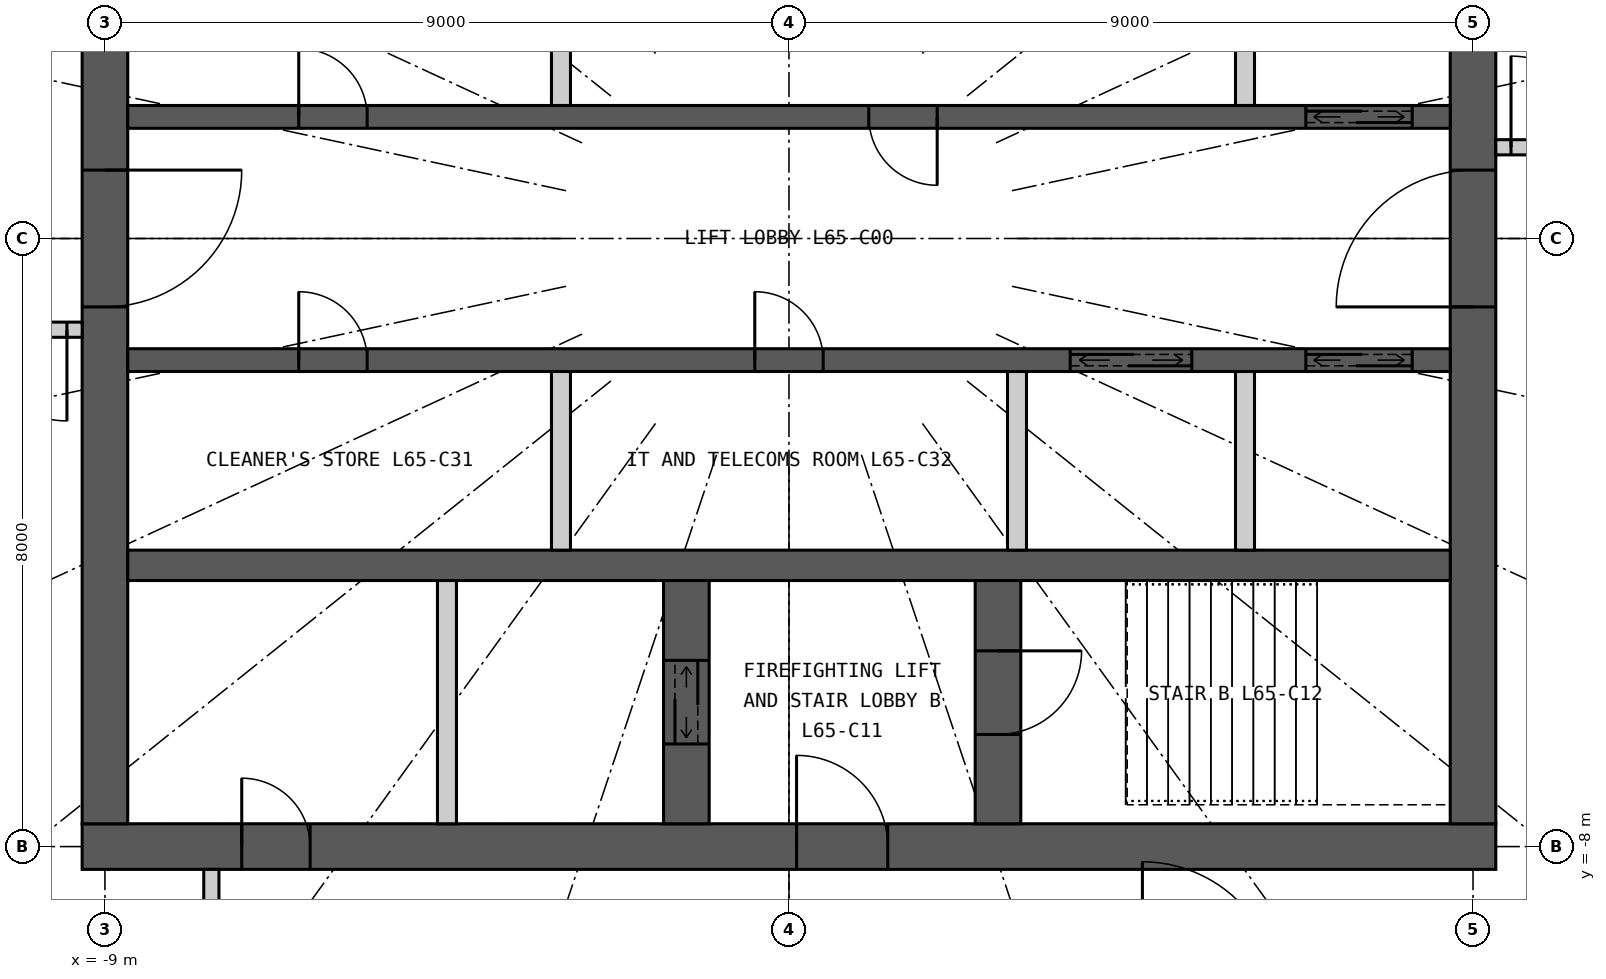
"""IFC4 building model, lengths in metres.
Left out: names, types, materials, properties, quantities, classifications, styles, units other than length and angle.
Written with IfcOpenShell. Run it as: python <this file> out.ifc"""

import sys

from ifc_helpers import new_model, si_unit, direction, frame, frame_2d, origin, place, context, subcontext, project, spatial, rectangle, extrude, element, fill, save


model = new_model("IFC4")
c1 = context("Model", 3, precision=1e-05, world=origin(), true_north=direction((0.0, 1.0)))
c2 = subcontext(c1, "Body", "Model", "MODEL_VIEW")
j1 = project(units=[si_unit("LENGTHUNIT", "METRE"), si_unit("PLANEANGLEUNIT", "RADIAN")], contexts=[c1])
p1 = place(None, origin())
s1 = spatial("IfcSite", under=j1, at=p1, CompositionType="ELEMENT")
p2 = place(p1, origin())
s2 = spatial("IfcBuilding", under=s1, at=p2, CompositionType="ELEMENT")
p3 = place(p2, frame((0.0, 0.0, 242.7)))
s3 = spatial("IfcBuildingStorey", under=s2, at=p3, CompositionType="ELEMENT", Elevation=242.7)
p4 = place(p3, frame((9.3, -8.0, 0.0), z_axis=(0.0, 0.0, 1.0), x_axis=(-1.0, 0.0, 0.0)))
e1 = element("IfcWall", 1, at=p4, inside=s3, PredefinedType="SHEAR", context=c2, shape_type="SweptSolid", body=[
    extrude(rectangle(XDim=18.6, YDim=0.6, at=frame_2d((9.3, 0.0))), origin(), (0.0, 0.0, 1.0), 6.0),
])
p5 = place(p4, frame((8.0, 0.0, 0.0)))
e2 = element("IfcOpeningElement", 2, at=p5, cuts=e1, PredefinedType="OPENING", context=c2, shape_type="SweptSolid", body=[
    extrude(rectangle(XDim=1.2, YDim=2.2, at=frame_2d((0.6, 1.1))), frame((0.0, 0.31, 0.0), z_axis=(0.0, -1.0, 0.0), x_axis=(1.0, 0.0, 0.0)), (0.0, 0.0, 1.0), 0.62),
])
p6 = place(p4, frame((15.6, 0.0, 0.0)))
e3 = element("IfcOpeningElement", 3, at=p6, cuts=e1, PredefinedType="OPENING", context=c2, shape_type="SweptSolid", body=[
    extrude(rectangle(XDim=0.9, YDim=2.2, at=frame_2d((0.45, 1.1))), frame((0.0, 0.31, 0.0), z_axis=(0.0, -1.0, 0.0), x_axis=(1.0, 0.0, 0.0)), (0.0, 0.0, 1.0), 0.62),
])
p7 = place(p3, frame((9.0, -7.7, 0.0), z_axis=(0.0, 0.0, 1.0), x_axis=(0.0, 1.0, 0.0)))
e4 = element("IfcWall", 4, at=p7, inside=s3, PredefinedType="SHEAR", context=c2, shape_type="SweptSolid", body=[
    extrude(rectangle(XDim=15.4, YDim=0.6, at=frame_2d((7.7, 0.0))), origin(), (0.0, 0.0, 1.0), 6.0),
])
p8 = place(p7, frame((6.8, 0.0, 0.0)))
e5 = element("IfcOpeningElement", 5, at=p8, cuts=e4, PredefinedType="OPENING", context=c2, shape_type="SweptSolid", body=[
    extrude(rectangle(XDim=1.8, YDim=2.2, at=frame_2d((0.9, 1.1))), frame((0.0, 0.31, 0.0), z_axis=(0.0, -1.0, 0.0), x_axis=(1.0, 0.0, 0.0)), (0.0, 0.0, 1.0), 0.62),
])
p9 = place(p3, frame((-9.0, 7.7, 0.0), z_axis=(0.0, 0.0, 1.0), x_axis=(0.0, -1.0, 0.0)))
e6 = element("IfcWall", 6, at=p9, inside=s3, PredefinedType="SHEAR", context=c2, shape_type="SweptSolid", body=[
    extrude(rectangle(XDim=15.4, YDim=0.6, at=frame_2d((7.7, 0.0))), origin(), (0.0, 0.0, 1.0), 6.0),
])
p10 = place(p9, frame((6.8, 0.0, 0.0)))
e7 = element("IfcOpeningElement", 7, at=p10, cuts=e6, PredefinedType="OPENING", context=c2, shape_type="SweptSolid", body=[
    extrude(rectangle(XDim=1.8, YDim=2.2, at=frame_2d((0.9, 1.1))), frame((0.0, 0.31, 0.0), z_axis=(0.0, -1.0, 0.0), x_axis=(1.0, 0.0, 0.0)), (0.0, 0.0, 1.0), 0.62),
])
p11 = place(p3, frame((-8.7, 1.6, 0.0), z_axis=(0.0, 0.0, 1.0), x_axis=(1.0, 0.0, 0.0)))
e8 = element("IfcWall", 8, at=p11, inside=s3, PredefinedType="SHEAR", context=c2, shape_type="SweptSolid", body=[
    extrude(rectangle(XDim=17.4, YDim=0.3, at=frame_2d((8.7, 0.0))), origin(), (0.0, 0.0, 1.0), 6.0),
])
p12 = place(p11, frame((15.5, 0.0, 0.0)))
e9 = element("IfcOpeningElement", 9, at=p12, cuts=e8, PredefinedType="OPENING", context=c2, shape_type="SweptSolid", body=[
    extrude(rectangle(XDim=1.4, YDim=2.4, at=frame_2d((0.7, 1.2))), frame((0.0, 0.16, 0.0), z_axis=(0.0, -1.0, 0.0), x_axis=(1.0, 0.0, 0.0)), (0.0, 0.0, 1.0), 0.32),
])
p13 = place(p11, frame((2.25, 0.0, 0.0)))
e10 = element("IfcOpeningElement", 10, at=p13, cuts=e8, PredefinedType="OPENING", context=c2, shape_type="SweptSolid", body=[
    extrude(rectangle(XDim=0.9, YDim=2.2, at=frame_2d((0.45, 1.1))), frame((0.0, 0.16, 0.0), z_axis=(0.0, -1.0, 0.0), x_axis=(1.0, 0.0, 0.0)), (0.0, 0.0, 1.0), 0.32),
])
p14 = place(p11, frame((9.75, 0.0, 0.0)))
e11 = element("IfcOpeningElement", 11, at=p14, cuts=e8, PredefinedType="OPENING", context=c2, shape_type="SweptSolid", body=[
    extrude(rectangle(XDim=0.9, YDim=2.2, at=frame_2d((0.45, 1.1))), frame((0.0, 0.16, 0.0), z_axis=(0.0, -1.0, 0.0), x_axis=(1.0, 0.0, 0.0)), (0.0, 0.0, 1.0), 0.32),
])
p15 = place(p3, frame((-8.7, -4.3, 0.0), z_axis=(0.0, 0.0, 1.0), x_axis=(1.0, 0.0, 0.0)))
e12 = element("IfcWall", 12, at=p15, inside=s3, PredefinedType="SHEAR", context=c2, shape_type="SweptSolid", body=[
    extrude(rectangle(XDim=17.4, YDim=0.4, at=frame_2d((8.7, 0.0))), origin(), (0.0, 0.0, 1.0), 6.0),
])
p16 = place(p3, frame((-8.7, -1.6, 0.0), z_axis=(0.0, 0.0, 1.0), x_axis=(1.0, 0.0, 0.0)))
e13 = element("IfcWall", 13, at=p16, inside=s3, PredefinedType="SHEAR", context=c2, shape_type="SweptSolid", body=[
    extrude(rectangle(XDim=17.4, YDim=0.3, at=frame_2d((8.7, 0.0))), origin(), (0.0, 0.0, 1.0), 6.0),
])
p17 = place(p16, frame((12.4, 0.0, 0.0)))
e14 = element("IfcOpeningElement", 14, at=p17, cuts=e13, PredefinedType="OPENING", context=c2, shape_type="SweptSolid", body=[
    extrude(rectangle(XDim=1.6, YDim=2.4, at=frame_2d((0.8, 1.2))), frame((0.0, 0.16, 0.0), z_axis=(0.0, -1.0, 0.0), x_axis=(1.0, 0.0, 0.0)), (0.0, 0.0, 1.0), 0.32),
])
p18 = place(p16, frame((15.5, 0.0, 0.0)))
e15 = element("IfcOpeningElement", 15, at=p18, cuts=e13, PredefinedType="OPENING", context=c2, shape_type="SweptSolid", body=[
    extrude(rectangle(XDim=1.4, YDim=2.4, at=frame_2d((0.7, 1.2))), frame((0.0, 0.16, 0.0), z_axis=(0.0, -1.0, 0.0), x_axis=(1.0, 0.0, 0.0)), (0.0, 0.0, 1.0), 0.32),
])
p19 = place(p16, frame((2.25, 0.0, 0.0)))
e16 = element("IfcOpeningElement", 16, at=p19, cuts=e13, PredefinedType="OPENING", context=c2, shape_type="SweptSolid", body=[
    extrude(rectangle(XDim=0.9, YDim=2.2, at=frame_2d((0.45, 1.1))), frame((0.0, 0.16, 0.0), z_axis=(0.0, -1.0, 0.0), x_axis=(1.0, 0.0, 0.0)), (0.0, 0.0, 1.0), 0.32),
])
p20 = place(p16, frame((8.25, 0.0, 0.0)))
e17 = element("IfcOpeningElement", 17, at=p20, cuts=e13, PredefinedType="OPENING", context=c2, shape_type="SweptSolid", body=[
    extrude(rectangle(XDim=0.9, YDim=2.2, at=frame_2d((0.45, 1.1))), frame((0.0, 0.16, 0.0), z_axis=(0.0, -1.0, 0.0), x_axis=(1.0, 0.0, 0.0)), (0.0, 0.0, 1.0), 0.32),
])
p21 = place(p3, frame((2.75, -7.7, 0.0), z_axis=(0.0, 0.0, 1.0), x_axis=(0.0, 1.0, 0.0)))
e18 = element("IfcWall", 18, at=p21, inside=s3, PredefinedType="SHEAR", context=c2, shape_type="SweptSolid", body=[
    extrude(rectangle(XDim=3.2, YDim=0.6, at=frame_2d((1.6, 0.0))), origin(), (0.0, 0.0, 1.0), 6.0),
])
p22 = place(p21, frame((1.175, 0.0, 0.0)))
e19 = element("IfcOpeningElement", 19, at=p22, cuts=e18, PredefinedType="OPENING", context=c2, shape_type="SweptSolid", body=[
    extrude(rectangle(XDim=1.1, YDim=2.2, at=frame_2d((0.55, 1.1))), frame((0.0, 0.31, 0.0), z_axis=(0.0, -1.0, 0.0), x_axis=(1.0, 0.0, 0.0)), (0.0, 0.0, 1.0), 0.62),
])
p23 = place(p3, frame((-1.35, -7.7, 0.0), z_axis=(0.0, 0.0, 1.0), x_axis=(0.0, 1.0, 0.0)))
e20 = element("IfcWall", 20, at=p23, inside=s3, PredefinedType="SHEAR", context=c2, shape_type="SweptSolid", body=[
    extrude(rectangle(XDim=3.2, YDim=0.6, at=frame_2d((1.6, 0.0))), origin(), (0.0, 0.0, 1.0), 6.0),
])
p24 = place(p23, frame((1.05, 0.0, 0.0)))
e21 = element("IfcOpeningElement", 21, at=p24, cuts=e20, PredefinedType="OPENING", context=c2, shape_type="SweptSolid", body=[
    extrude(rectangle(XDim=1.1, YDim=2.2, at=frame_2d((0.55, 1.1))), frame((0.0, 0.31, 0.0), z_axis=(0.0, -1.0, 0.0), x_axis=(1.0, 0.0, 0.0)), (0.0, 0.0, 1.0), 0.62),
])
p25 = place(p3, frame((-4.5, -7.7, 0.0), z_axis=(0.0, 0.0, 1.0), x_axis=(0.0, 1.0, 0.0)))
e22 = element("IfcWall", 22, at=p25, inside=s3, PredefinedType="PARTITIONING", context=c2, shape_type="SweptSolid", body=[
    extrude(rectangle(XDim=3.2, YDim=0.25, at=frame_2d((1.6, 0.0))), origin(), (0.0, 0.0, 1.0), 6.0),
])
for number, where, z_axis, x_axis in (
    (23, (-3.0, 1.75, 0.0), (0.0, 0.0, 1.0), (0.0, 1.0, 0.0)),
    (24, (6.0, 1.75, 0.0), (0.0, 0.0, 1.0), (0.0, 1.0, 0.0)),
    (25, (-3.0, -4.1, 0.0), (0.0, 0.0, 1.0), (0.0, 1.0, 0.0)),
    (26, (3.0, -4.1, 0.0), (0.0, 0.0, 1.0), (0.0, 1.0, 0.0)),
    (27, (6.0, -4.1, 0.0), (0.0, 0.0, 1.0), (0.0, 1.0, 0.0)),
):
    element("IfcWall", number, at=place(p3, frame(where, z_axis=z_axis, x_axis=x_axis)), inside=s3, PredefinedType="PARTITIONING", context=c2, shape_type="SweptSolid", body=[
        extrude(rectangle(XDim=2.35, YDim=0.25, at=frame_2d((1.175, 0.0))), origin(), (0.0, 0.0, 1.0), 6.0),
    ])
p26 = place(p3, frame((-9.3, -1.2, 0.0), z_axis=(0.0, 0.0, 1.0), x_axis=(-1.0, 0.0, 0.0)))
e28 = element("IfcWall", 28, at=p26, inside=s3, PredefinedType="PARTITIONING", context=c2, shape_type="SweptSolid", body=[
    extrude(rectangle(XDim=1.7, YDim=0.2, at=frame_2d((0.85, 0.0))), origin(), (0.0, 0.0, 1.0), 5.7),
])
p27 = place(p26, frame((0.2, 0.0, 0.0)))
e29 = element("IfcOpeningElement", 29, at=p27, cuts=e28, PredefinedType="OPENING", context=c2, shape_type="SweptSolid", body=[
    extrude(rectangle(XDim=1.2, YDim=2.2, at=frame_2d((0.6, 1.1))), frame((0.0, 0.11, 0.0), z_axis=(0.0, -1.0, 0.0), x_axis=(1.0, 0.0, 0.0)), (0.0, 0.0, 1.0), 0.22),
])
p28 = place(p3, frame((-7.6, -8.3, 0.0), z_axis=(0.0, 0.0, 1.0), x_axis=(0.0, -1.0, 0.0)))
e30 = element("IfcWall", 30, at=p28, inside=s3, PredefinedType="PARTITIONING", context=c2, shape_type="SweptSolid", body=[
    extrude(rectangle(XDim=1.7, YDim=0.2, at=frame_2d((0.85, 0.0))), origin(), (0.0, 0.0, 1.0), 5.7),
])
p29 = place(p3, frame((9.3, 1.2, 0.0), z_axis=(0.0, 0.0, 1.0), x_axis=(1.0, 0.0, 0.0)))
e31 = element("IfcWall", 31, at=p29, inside=s3, PredefinedType="PARTITIONING", context=c2, shape_type="SweptSolid", body=[
    extrude(rectangle(XDim=1.7, YDim=0.2, at=frame_2d((0.85, 0.0))), origin(), (0.0, 0.0, 1.0), 5.7),
])
p30 = place(p29, frame((0.2, 0.0, 0.0)))
e32 = element("IfcOpeningElement", 32, at=p30, cuts=e31, PredefinedType="OPENING", context=c2, shape_type="SweptSolid", body=[
    extrude(rectangle(XDim=1.2, YDim=2.2, at=frame_2d((0.6, 1.1))), frame((0.0, 0.11, 0.0), z_axis=(0.0, -1.0, 0.0), x_axis=(1.0, 0.0, 0.0)), (0.0, 0.0, 1.0), 0.22),
])
p31 = place(p30, origin())
e33 = element("IfcDoor", 33, at=p31, inside=s3, OperationType="SINGLE_SWING_LEFT", PredefinedType="DOOR", context=c2, shape_type="SweptSolid", body=[
    extrude(rectangle(XDim=1.2, YDim=2.2, at=frame_2d((0.6, 1.1))), frame((0.0, 0.025, 0.0), z_axis=(0.0, -1.0, 0.0), x_axis=(1.0, 0.0, 0.0)), (0.0, 0.0, 1.0), 0.05),
])
fill(e32, e33)
p32 = place(p27, origin())
e34 = element("IfcDoor", 34, at=p32, inside=s3, OperationType="SINGLE_SWING_LEFT", PredefinedType="DOOR", context=c2, shape_type="SweptSolid", body=[
    extrude(rectangle(XDim=1.2, YDim=2.2, at=frame_2d((0.6, 1.1))), frame((0.0, 0.025, 0.0), z_axis=(0.0, -1.0, 0.0), x_axis=(1.0, 0.0, 0.0)), (0.0, 0.0, 1.0), 0.05),
])
fill(e29, e34)
p33 = place(p5, origin())
e35 = element("IfcDoor", 35, at=p33, inside=s3, OperationType="SINGLE_SWING_RIGHT", PredefinedType="DOOR", context=c2, shape_type="SweptSolid", body=[
    extrude(rectangle(XDim=1.2, YDim=2.2, at=frame_2d((0.6, 1.1))), frame((0.0, 0.025, 0.0), z_axis=(0.0, -1.0, 0.0), x_axis=(1.0, 0.0, 0.0)), (0.0, 0.0, 1.0), 0.05),
])
fill(e2, e35)
p34 = place(p22, origin())
e36 = element("IfcDoor", 36, at=p34, inside=s3, OperationType="SINGLE_SWING_RIGHT", PredefinedType="DOOR", context=c2, shape_type="SweptSolid", body=[
    extrude(rectangle(XDim=1.1, YDim=2.2, at=frame_2d((0.55, 1.1))), frame((0.0, 0.025, 0.0), z_axis=(0.0, -1.0, 0.0), x_axis=(1.0, 0.0, 0.0)), (0.0, 0.0, 1.0), 0.05),
])
fill(e19, e36)
p35 = place(p24, origin())
e37 = element("IfcDoor", 37, at=p35, inside=s3, OperationType="DOUBLE_DOOR_SLIDING", PredefinedType="DOOR", context=c2, shape_type="SweptSolid", body=[
    extrude(rectangle(XDim=1.1, YDim=2.2, at=frame_2d((0.55, 1.1))), frame((0.0, 0.025, 0.0), z_axis=(0.0, -1.0, 0.0), x_axis=(1.0, 0.0, 0.0)), (0.0, 0.0, 1.0), 0.05),
])
fill(e21, e37)
p36 = place(p6, origin())
e38 = element("IfcDoor", 38, at=p36, inside=s3, OperationType="SINGLE_SWING_RIGHT", PredefinedType="DOOR", context=c2, shape_type="SweptSolid", body=[
    extrude(rectangle(XDim=0.9, YDim=2.2, at=frame_2d((0.45, 1.1))), frame((0.0, 0.025, 0.0), z_axis=(0.0, -1.0, 0.0), x_axis=(1.0, 0.0, 0.0)), (0.0, 0.0, 1.0), 0.05),
])
fill(e3, e38)
p37 = place(p12, origin())
e39 = element("IfcDoor", 39, at=p37, inside=s3, OperationType="DOUBLE_DOOR_SLIDING", PredefinedType="DOOR", context=c2, shape_type="SweptSolid", body=[
    extrude(rectangle(XDim=1.4, YDim=2.4, at=frame_2d((0.7, 1.2))), frame((0.0, 0.025, 0.0), z_axis=(0.0, -1.0, 0.0), x_axis=(1.0, 0.0, 0.0)), (0.0, 0.0, 1.0), 0.05),
])
fill(e9, e39)
p38 = place(p17, origin())
e40 = element("IfcDoor", 40, at=p38, inside=s3, OperationType="DOUBLE_DOOR_SLIDING", PredefinedType="DOOR", context=c2, shape_type="SweptSolid", body=[
    extrude(rectangle(XDim=1.6, YDim=2.4, at=frame_2d((0.8, 1.2))), frame((0.0, 0.025, 0.0), z_axis=(0.0, -1.0, 0.0), x_axis=(1.0, 0.0, 0.0)), (0.0, 0.0, 1.0), 0.05),
])
fill(e14, e40)
p39 = place(p18, origin())
e41 = element("IfcDoor", 41, at=p39, inside=s3, OperationType="DOUBLE_DOOR_SLIDING", PredefinedType="DOOR", context=c2, shape_type="SweptSolid", body=[
    extrude(rectangle(XDim=1.4, YDim=2.4, at=frame_2d((0.7, 1.2))), frame((0.0, 0.025, 0.0), z_axis=(0.0, -1.0, 0.0), x_axis=(1.0, 0.0, 0.0)), (0.0, 0.0, 1.0), 0.05),
])
fill(e15, e41)
p40 = place(p13, origin())
e42 = element("IfcDoor", 42, at=p40, inside=s3, OperationType="SINGLE_SWING_LEFT", PredefinedType="DOOR", context=c2, shape_type="SweptSolid", body=[
    extrude(rectangle(XDim=0.9, YDim=2.2, at=frame_2d((0.45, 1.1))), frame((0.0, 0.025, 0.0), z_axis=(0.0, -1.0, 0.0), x_axis=(1.0, 0.0, 0.0)), (0.0, 0.0, 1.0), 0.05),
])
fill(e10, e42)
p41 = place(p14, origin())
e43 = element("IfcDoor", 43, at=p41, inside=s3, OperationType="SINGLE_SWING_RIGHT", PredefinedType="DOOR", context=c2, shape_type="SweptSolid", body=[
    extrude(rectangle(XDim=0.9, YDim=2.2, at=frame_2d((0.45, 1.1))), frame((0.0, 0.025, 0.0), z_axis=(0.0, -1.0, 0.0), x_axis=(1.0, 0.0, 0.0)), (0.0, 0.0, 1.0), 0.05),
])
fill(e11, e43)
p42 = place(p19, origin())
e44 = element("IfcDoor", 44, at=p42, inside=s3, OperationType="SINGLE_SWING_LEFT", PredefinedType="DOOR", context=c2, shape_type="SweptSolid", body=[
    extrude(rectangle(XDim=0.9, YDim=2.2, at=frame_2d((0.45, 1.1))), frame((0.0, 0.025, 0.0), z_axis=(0.0, -1.0, 0.0), x_axis=(1.0, 0.0, 0.0)), (0.0, 0.0, 1.0), 0.05),
])
fill(e16, e44)
p43 = place(p20, origin())
e45 = element("IfcDoor", 45, at=p43, inside=s3, OperationType="SINGLE_SWING_LEFT", PredefinedType="DOOR", context=c2, shape_type="SweptSolid", body=[
    extrude(rectangle(XDim=0.9, YDim=2.2, at=frame_2d((0.45, 1.1))), frame((0.0, 0.025, 0.0), z_axis=(0.0, -1.0, 0.0), x_axis=(1.0, 0.0, 0.0)), (0.0, 0.0, 1.0), 0.05),
])
fill(e17, e45)
p44 = place(p8, origin())
e46 = element("IfcDoor", 46, at=p44, inside=s3, OperationType="DOUBLE_DOOR_DOUBLE_SWING", PredefinedType="DOOR", context=c2, shape_type="SweptSolid", body=[
    extrude(rectangle(XDim=1.8, YDim=2.2, at=frame_2d((0.9, 1.1))), frame((0.0, 0.025, 0.0), z_axis=(0.0, -1.0, 0.0), x_axis=(1.0, 0.0, 0.0)), (0.0, 0.0, 1.0), 0.05),
])
fill(e5, e46)
p45 = place(p10, origin())
e47 = element("IfcDoor", 47, at=p45, inside=s3, OperationType="DOUBLE_DOOR_DOUBLE_SWING", PredefinedType="DOOR", context=c2, shape_type="SweptSolid", body=[
    extrude(rectangle(XDim=1.8, YDim=2.2, at=frame_2d((0.9, 1.1))), frame((0.0, 0.025, 0.0), z_axis=(0.0, -1.0, 0.0), x_axis=(1.0, 0.0, 0.0)), (0.0, 0.0, 1.0), 0.05),
])
fill(e7, e47)
save(model, sys.argv[1])
